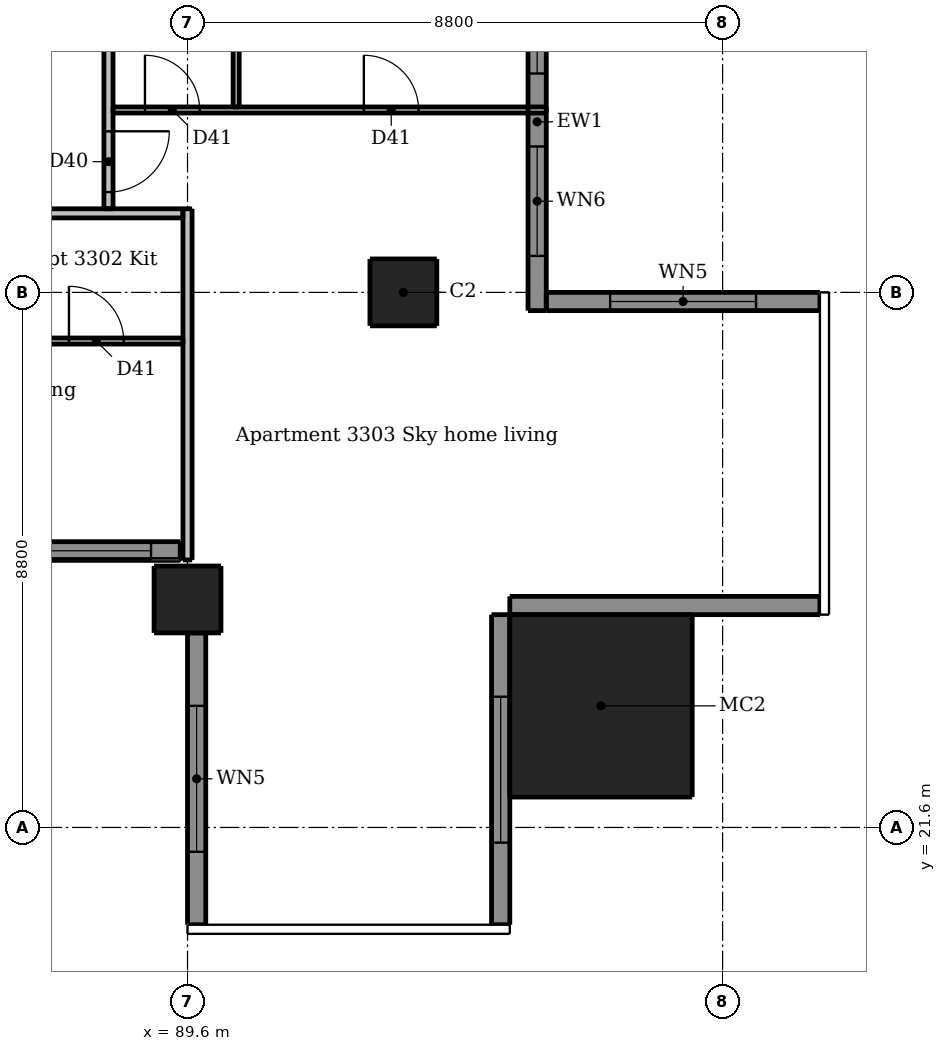
"""IFC4 building model, lengths in metres.
Left out: names, types, materials, properties, quantities, classifications, styles, units other than length and angle.
Written with IfcOpenShell. Run it as: python <this file> out.ifc"""

import sys

from ifc_helpers import new_model, si_unit, direction, frame, frame_2d, origin, origin_2d, place, context, subcontext, project, spatial, rectangle, extrude, element, fill, save


model = new_model("IFC4")
c1 = context("Model", 3, precision=1e-05, world=origin(), true_north=direction((0.0, 1.0)))
c2 = subcontext(c1, "Body", "Model", "MODEL_VIEW")
j1 = project(units=[si_unit("LENGTHUNIT", "METRE"), si_unit("PLANEANGLEUNIT", "RADIAN")], contexts=[c1])
p1 = place(None, origin())
s1 = spatial("IfcSite", under=j1, at=p1, CompositionType="ELEMENT")
p2 = place(p1, origin())
s2 = spatial("IfcBuilding", under=s1, at=p2, CompositionType="ELEMENT")
p3 = place(p2, frame((0.0, 0.0, 121.6)))
s3 = spatial("IfcBuildingStorey", under=s2, at=p3, CompositionType="ELEMENT", Elevation=121.6)
for number, where, z_axis, x_axis in (
    (1, (89.6, 25.35, 0.0), (0.0, 0.0, 1.0), (1.0, 0.0, 0.0)),
    (2, (93.15, 30.4, 0.0), (0.0, 0.0, 1.0), (1.0, 0.0, 0.0)),
):
    element("IfcColumn", number, at=place(p3, frame(where, z_axis=z_axis, x_axis=x_axis)), inside=s3, PredefinedType="COLUMN", context=c2, shape_type="SweptSolid", body=[
        extrude(rectangle(XDim=1.1, YDim=1.1, at=origin_2d()), origin(), (0.0, 0.0, 1.0), 2.95),
    ])
p4 = place(p3, frame((96.4, 23.6, 0.0), z_axis=(0.0, 0.0, 1.0), x_axis=(1.0, 0.0, 0.0)))
e3 = element("IfcColumn", 3, at=p4, inside=s3, PredefinedType="COLUMN", context=c2, shape_type="SweptSolid", body=[
    extrude(rectangle(XDim=3.0, YDim=3.0, at=origin_2d()), origin(), (0.0, 0.0, 1.0), 3.3),
])
p5 = place(p3, frame((89.75, 24.8, 0.0), z_axis=(0.0, 0.0, 1.0), x_axis=(0.0, -1.0, 0.0)))
e4 = element("IfcWall", 4, at=p5, inside=s3, PredefinedType="SOLIDWALL", context=c2, shape_type="SweptSolid", body=[
    extrude(rectangle(XDim=4.8, YDim=0.3, at=frame_2d((2.4, 0.0))), origin(), (0.0, 0.0, 1.0), 2.95),
])
p6 = place(p5, frame((1.2, 0.0, 0.15)))
e5 = element("IfcOpeningElement", 5, at=p6, cuts=e4, PredefinedType="OPENING", context=c2, shape_type="SweptSolid", body=[
    extrude(rectangle(XDim=2.4, YDim=2.1, at=frame_2d((1.2, 1.05))), frame((0.0, 0.16, 0.0), z_axis=(0.0, -1.0, 0.0), x_axis=(1.0, 0.0, 0.0)), (0.0, 0.0, 1.0), 0.32),
])
p7 = place(p3, frame((94.75, 20.0, 0.0), z_axis=(0.0, 0.0, 1.0), x_axis=(0.0, 1.0, 0.0)))
e6 = element("IfcWall", 6, at=p7, inside=s3, PredefinedType="SOLIDWALL", context=c2, shape_type="SweptSolid", body=[
    extrude(rectangle(XDim=5.1, YDim=0.3, at=frame_2d((2.55, 0.0))), origin(), (0.0, 0.0, 1.0), 2.95),
])
p8 = place(p7, frame((1.35, 0.0, 0.15)))
e7 = element("IfcOpeningElement", 7, at=p8, cuts=e6, PredefinedType="OPENING", context=c2, shape_type="SweptSolid", body=[
    extrude(rectangle(XDim=2.4, YDim=2.1, at=frame_2d((1.2, 1.05))), frame((0.0, 0.16, 0.0), z_axis=(0.0, -1.0, 0.0), x_axis=(1.0, 0.0, 0.0)), (0.0, 0.0, 1.0), 0.32),
])
p9 = place(p3, frame((94.9, 25.25, 0.0), z_axis=(0.0, 0.0, 1.0), x_axis=(1.0, 0.0, 0.0)))
e8 = element("IfcWall", 8, at=p9, inside=s3, PredefinedType="SOLIDWALL", context=c2, shape_type="SweptSolid", body=[
    extrude(rectangle(XDim=5.1, YDim=0.3, at=frame_2d((2.55, 0.0))), origin(), (0.0, 0.0, 1.0), 2.95),
])
p10 = place(p3, frame((100.0, 30.25, 0.0), z_axis=(0.0, 0.0, 1.0), x_axis=(-1.0, 0.0, 0.0)))
e9 = element("IfcWall", 9, at=p10, inside=s3, PredefinedType="SOLIDWALL", context=c2, shape_type="SweptSolid", body=[
    extrude(rectangle(XDim=4.5, YDim=0.3, at=frame_2d((2.25, 0.0))), origin(), (0.0, 0.0, 1.0), 2.95),
])
p11 = place(p10, frame((1.05, 0.0, 0.15)))
e10 = element("IfcOpeningElement", 10, at=p11, cuts=e9, PredefinedType="OPENING", context=c2, shape_type="SweptSolid", body=[
    extrude(rectangle(XDim=2.4, YDim=2.1, at=frame_2d((1.2, 1.05))), frame((0.0, 0.16, 0.0), z_axis=(0.0, -1.0, 0.0), x_axis=(1.0, 0.0, 0.0)), (0.0, 0.0, 1.0), 0.32),
])
p12 = place(p3, frame((83.72, 26.15, 0.0), z_axis=(0.0, 0.0, 1.0), x_axis=(1.0, 0.0, 0.0)))
e11 = element("IfcWall", 11, at=p12, inside=s3, PredefinedType="SOLIDWALL", context=c2, shape_type="SweptSolid", body=[
    extrude(rectangle(XDim=5.76, YDim=0.3, at=frame_2d((2.88, 0.0))), origin(), (0.0, 0.0, 1.0), 2.95),
])
p13 = place(p12, frame((0.48, 0.0, 0.15)))
e12 = element("IfcOpeningElement", 12, at=p13, cuts=e11, PredefinedType="OPENING", context=c2, shape_type="SweptSolid", body=[
    extrude(rectangle(XDim=1.8, YDim=2.1, at=frame_2d((0.9, 1.05))), frame((0.0, 0.16, 0.0), z_axis=(0.0, -1.0, 0.0), x_axis=(1.0, 0.0, 0.0)), (0.0, 0.0, 1.0), 0.32),
])
p14 = place(p12, frame((3.48, 0.0, 0.15)))
e13 = element("IfcOpeningElement", 13, at=p14, cuts=e11, PredefinedType="OPENING", context=c2, shape_type="SweptSolid", body=[
    extrude(rectangle(XDim=1.8, YDim=2.1, at=frame_2d((0.9, 1.05))), frame((0.0, 0.16, 0.0), z_axis=(0.0, -1.0, 0.0), x_axis=(1.0, 0.0, 0.0)), (0.0, 0.0, 1.0), 0.32),
])
p15 = place(p3, frame((95.35, 30.1, 0.0), z_axis=(0.0, 0.0, 1.0), x_axis=(0.0, 1.0, 0.0)))
e14 = element("IfcWall", 14, at=p15, inside=s3, PredefinedType="SOLIDWALL", context=c2, shape_type="SweptSolid", body=[
    extrude(rectangle(XDim=6.21, YDim=0.3, at=frame_2d((3.105, 0.0))), origin(), (0.0, 0.0, 1.0), 2.34),
])
p16 = place(p15, frame((0.9, 0.0, 0.15)))
e15 = element("IfcOpeningElement", 15, at=p16, cuts=e14, PredefinedType="OPENING", context=c2, shape_type="SweptSolid", body=[
    extrude(rectangle(XDim=1.8, YDim=2.1, at=frame_2d((0.9, 1.05))), frame((0.0, 0.16, 0.0), z_axis=(0.0, -1.0, 0.0), x_axis=(1.0, 0.0, 0.0)), (0.0, 0.0, 1.0), 0.32),
])
p17 = place(p15, frame((3.9, 0.0, 0.15)))
e16 = element("IfcOpeningElement", 16, at=p17, cuts=e14, PredefinedType="OPENING", context=c2, shape_type="SweptSolid", body=[
    extrude(rectangle(XDim=1.8, YDim=2.1, at=frame_2d((0.9, 1.05))), frame((0.0, 0.16, 0.0), z_axis=(0.0, -1.0, 0.0), x_axis=(1.0, 0.0, 0.0)), (0.0, 0.0, 1.0), 0.32),
])
p18 = place(p3, frame((90.4, 33.45, 0.0), z_axis=(0.0, 0.0, 1.0), x_axis=(0.0, 1.0, 0.0)))
e17 = element("IfcWall", 17, at=p18, inside=s3, PredefinedType="PARTITIONING", context=c2, shape_type="SweptSolid", body=[
    extrude(rectangle(XDim=5.875, YDim=0.1, at=frame_2d((2.938, 0.0))), origin(), (0.0, 0.0, 1.0), 2.95),
])
p19 = place(p18, frame((3.75, 0.0, 0.0)))
e18 = element("IfcOpeningElement", 18, at=p19, cuts=e17, PredefinedType="OPENING", context=c2, shape_type="SweptSolid", body=[
    extrude(rectangle(XDim=0.8, YDim=2.1, at=frame_2d((0.4, 1.05))), frame((0.0, 0.06, 0.0), z_axis=(0.0, -1.0, 0.0), x_axis=(1.0, 0.0, 0.0)), (0.0, 0.0, 1.0), 0.12),
])
p20 = place(p3, frame((88.375, 33.4, 0.0), z_axis=(0.0, 0.0, 1.0), x_axis=(1.0, 0.0, 0.0)))
e19 = element("IfcWall", 19, at=p20, inside=s3, PredefinedType="PARTITIONING", context=c2, shape_type="SweptSolid", body=[
    extrude(rectangle(XDim=7.125, YDim=0.1, at=frame_2d((3.562, 0.0))), origin(), (0.0, 0.0, 1.0), 2.95),
])
p21 = place(p20, frame((0.525, 0.0, 0.0)))
e20 = element("IfcOpeningElement", 20, at=p21, cuts=e19, PredefinedType="OPENING", context=c2, shape_type="SweptSolid", body=[
    extrude(rectangle(XDim=0.9, YDim=2.1, at=frame_2d((0.45, 1.05))), frame((0.0, 0.06, 0.0), z_axis=(0.0, -1.0, 0.0), x_axis=(1.0, 0.0, 0.0)), (0.0, 0.0, 1.0), 0.12),
])
p22 = place(p20, frame((4.125, 0.0, 0.0)))
e21 = element("IfcOpeningElement", 21, at=p22, cuts=e19, PredefinedType="OPENING", context=c2, shape_type="SweptSolid", body=[
    extrude(rectangle(XDim=0.9, YDim=2.1, at=frame_2d((0.45, 1.05))), frame((0.0, 0.06, 0.0), z_axis=(0.0, -1.0, 0.0), x_axis=(1.0, 0.0, 0.0)), (0.0, 0.0, 1.0), 0.12),
])
p23 = place(p3, frame((86.65, 29.6, 0.0), z_axis=(0.0, 0.0, 1.0), x_axis=(1.0, 0.0, 0.0)))
e22 = element("IfcWall", 22, at=p23, inside=s3, PredefinedType="PARTITIONING", context=c2, shape_type="SweptSolid", body=[
    extrude(rectangle(XDim=2.875, YDim=0.1, at=frame_2d((1.438, 0.0))), origin(), (0.0, 0.0, 1.0), 2.95),
])
p24 = place(p23, frame((1.0, 0.0, 0.0)))
e23 = element("IfcOpeningElement", 23, at=p24, cuts=e22, PredefinedType="OPENING", context=c2, shape_type="SweptSolid", body=[
    extrude(rectangle(XDim=0.9, YDim=2.1, at=frame_2d((0.45, 1.05))), frame((0.0, 0.06, 0.0), z_axis=(0.0, -1.0, 0.0), x_axis=(1.0, 0.0, 0.0)), (0.0, 0.0, 1.0), 0.12),
])
p25 = place(p3, frame((88.3, 60.475, 0.0), z_axis=(0.0, 0.0, 1.0), x_axis=(0.0, -1.0, 0.0)))
e24 = element("IfcWall", 24, at=p25, inside=s3, PredefinedType="PARTITIONING", context=c2, shape_type="SweptSolid", body=[
    extrude(rectangle(XDim=28.7, YDim=0.15, at=frame_2d((14.35, 0.0))), origin(), (0.0, 0.0, 1.0), 2.95),
])
p26 = place(p25, frame((27.425, 0.0, 0.0)))
e25 = element("IfcOpeningElement", 25, at=p26, cuts=e24, PredefinedType="OPENING", context=c2, shape_type="SweptSolid", body=[
    extrude(rectangle(XDim=1.0, YDim=2.1, at=frame_2d((0.5, 1.05))), frame((0.0, 0.085, 0.0), z_axis=(0.0, -1.0, 0.0), x_axis=(1.0, 0.0, 0.0)), (0.0, 0.0, 1.0), 0.17),
])
p27 = place(p25, frame((13.075, 0.0, 0.0)))
e26 = element("IfcOpeningElement", 26, at=p27, cuts=e24, PredefinedType="OPENING", context=c2, shape_type="SweptSolid", body=[
    extrude(rectangle(XDim=1.0, YDim=2.1, at=frame_2d((0.5, 1.05))), frame((0.0, 0.085, 0.0), z_axis=(0.0, -1.0, 0.0), x_axis=(1.0, 0.0, 0.0)), (0.0, 0.0, 1.0), 0.17),
])
p28 = place(p25, frame((2.575, 0.0, 0.0)))
e27 = element("IfcOpeningElement", 27, at=p28, cuts=e24, PredefinedType="OPENING", context=c2, shape_type="SweptSolid", body=[
    extrude(rectangle(XDim=1.0, YDim=2.1, at=frame_2d((0.5, 1.05))), frame((0.0, 0.085, 0.0), z_axis=(0.0, -1.0, 0.0), x_axis=(1.0, 0.0, 0.0)), (0.0, 0.0, 1.0), 0.17),
])
p29 = place(p3, frame((89.6, 26.0, 0.0), z_axis=(0.0, 0.0, 1.0), x_axis=(0.0, 1.0, 0.0)))
e28 = element("IfcWall", 28, at=p29, inside=s3, PredefinedType="PARTITIONING", context=c2, shape_type="SweptSolid", body=[
    extrude(rectangle(XDim=5.775, YDim=0.15, at=frame_2d((2.887, 0.0))), origin(), (0.0, 0.0, 1.0), 2.332),
])
p30 = place(p3, frame((89.525, 31.7, 0.0), z_axis=(0.0, 0.0, 1.0), x_axis=(-1.0, 0.0, 0.0)))
e29 = element("IfcWall", 29, at=p30, inside=s3, PredefinedType="PARTITIONING", context=c2, shape_type="SweptSolid", body=[
    extrude(rectangle(XDim=28.75, YDim=0.15, at=frame_2d((14.375, 0.0))), origin(), (0.0, 0.0, 1.0), 2.95),
])
p31 = place(p30, frame((24.625, 0.0, 0.0)))
e30 = element("IfcOpeningElement", 30, at=p31, cuts=e29, PredefinedType="OPENING", context=c2, shape_type="SweptSolid", body=[
    extrude(rectangle(XDim=1.0, YDim=2.1, at=frame_2d((0.5, 1.05))), frame((0.0, 0.085, 0.0), z_axis=(0.0, -1.0, 0.0), x_axis=(1.0, 0.0, 0.0)), (0.0, 0.0, 1.0), 0.17),
])
p32 = place(p30, frame((5.425, 0.0, 0.0)))
e31 = element("IfcOpeningElement", 31, at=p32, cuts=e29, PredefinedType="OPENING", context=c2, shape_type="SweptSolid", body=[
    extrude(rectangle(XDim=1.0, YDim=2.1, at=frame_2d((0.5, 1.05))), frame((0.0, 0.085, 0.0), z_axis=(0.0, -1.0, 0.0), x_axis=(1.0, 0.0, 0.0)), (0.0, 0.0, 1.0), 0.17),
])
p33 = place(p6, origin())
e32 = element("IfcWindow", 32, at=p33, inside=s3, PartitioningType="DOUBLE_PANEL_VERTICAL", PredefinedType="WINDOW", context=c2, shape_type="SweptSolid", body=[
    extrude(rectangle(XDim=2.4, YDim=2.1, at=frame_2d((1.2, 1.05))), frame((0.0, 0.03, 0.0), z_axis=(0.0, -1.0, 0.0), x_axis=(1.0, 0.0, 0.0)), (0.0, 0.0, 1.0), 0.06),
])
fill(e5, e32)
p34 = place(p8, origin())
e33 = element("IfcWindow", 33, at=p34, inside=s3, PartitioningType="DOUBLE_PANEL_VERTICAL", PredefinedType="WINDOW", context=c2, shape_type="SweptSolid", body=[
    extrude(rectangle(XDim=2.4, YDim=2.1, at=frame_2d((1.2, 1.05))), frame((0.0, 0.03, 0.0), z_axis=(0.0, -1.0, 0.0), x_axis=(1.0, 0.0, 0.0)), (0.0, 0.0, 1.0), 0.06),
])
fill(e7, e33)
p35 = place(p11, origin())
e34 = element("IfcWindow", 34, at=p35, inside=s3, PartitioningType="DOUBLE_PANEL_VERTICAL", PredefinedType="WINDOW", context=c2, shape_type="SweptSolid", body=[
    extrude(rectangle(XDim=2.4, YDim=2.1, at=frame_2d((1.2, 1.05))), frame((0.0, 0.03, 0.0), z_axis=(0.0, -1.0, 0.0), x_axis=(1.0, 0.0, 0.0)), (0.0, 0.0, 1.0), 0.06),
])
fill(e10, e34)
p36 = place(p14, origin())
e35 = element("IfcWindow", 35, at=p36, inside=s3, PartitioningType="DOUBLE_PANEL_VERTICAL", PredefinedType="WINDOW", context=c2, shape_type="SweptSolid", body=[
    extrude(rectangle(XDim=1.8, YDim=2.1, at=frame_2d((0.9, 1.05))), frame((0.0, 0.03, 0.0), z_axis=(0.0, -1.0, 0.0), x_axis=(1.0, 0.0, 0.0)), (0.0, 0.0, 1.0), 0.06),
])
fill(e13, e35)
p37 = place(p16, origin())
e36 = element("IfcWindow", 36, at=p37, inside=s3, PartitioningType="DOUBLE_PANEL_VERTICAL", PredefinedType="WINDOW", context=c2, shape_type="SweptSolid", body=[
    extrude(rectangle(XDim=1.8, YDim=2.1, at=frame_2d((0.9, 1.05))), frame((0.0, 0.03, 0.0), z_axis=(0.0, -1.0, 0.0), x_axis=(1.0, 0.0, 0.0)), (0.0, 0.0, 1.0), 0.06),
])
fill(e15, e36)
p38 = place(p17, origin())
e37 = element("IfcWindow", 37, at=p38, inside=s3, PartitioningType="DOUBLE_PANEL_VERTICAL", PredefinedType="WINDOW", context=c2, shape_type="SweptSolid", body=[
    extrude(rectangle(XDim=1.8, YDim=2.1, at=frame_2d((0.9, 1.05))), frame((0.0, 0.03, 0.0), z_axis=(0.0, -1.0, 0.0), x_axis=(1.0, 0.0, 0.0)), (0.0, 0.0, 1.0), 0.06),
])
fill(e16, e37)
p39 = place(p24, origin())
e38 = element("IfcDoor", 38, at=p39, inside=s3, OperationType="SINGLE_SWING_LEFT", PredefinedType="DOOR", context=c2, shape_type="SweptSolid", body=[
    extrude(rectangle(XDim=0.9, YDim=2.1, at=frame_2d((0.45, 1.05))), frame((0.0, 0.025, 0.0), z_axis=(0.0, -1.0, 0.0), x_axis=(1.0, 0.0, 0.0)), (0.0, 0.0, 1.0), 0.05),
])
fill(e23, e38)
p40 = place(p26, origin())
e39 = element("IfcDoor", 39, at=p40, inside=s3, OperationType="SINGLE_SWING_LEFT", PredefinedType="DOOR", context=c2, shape_type="SweptSolid", body=[
    extrude(rectangle(XDim=1.0, YDim=2.1, at=frame_2d((0.5, 1.05))), frame((0.0, 0.025, 0.0), z_axis=(0.0, -1.0, 0.0), x_axis=(1.0, 0.0, 0.0)), (0.0, 0.0, 1.0), 0.05),
])
fill(e25, e39)
p41 = place(p21, origin())
e40 = element("IfcDoor", 40, at=p41, inside=s3, OperationType="SINGLE_SWING_LEFT", PredefinedType="DOOR", context=c2, shape_type="SweptSolid", body=[
    extrude(rectangle(XDim=0.9, YDim=2.1, at=frame_2d((0.45, 1.05))), frame((0.0, 0.025, 0.0), z_axis=(0.0, -1.0, 0.0), x_axis=(1.0, 0.0, 0.0)), (0.0, 0.0, 1.0), 0.05),
])
fill(e20, e40)
p42 = place(p22, origin())
e41 = element("IfcDoor", 41, at=p42, inside=s3, OperationType="SINGLE_SWING_LEFT", PredefinedType="DOOR", context=c2, shape_type="SweptSolid", body=[
    extrude(rectangle(XDim=0.9, YDim=2.1, at=frame_2d((0.45, 1.05))), frame((0.0, 0.025, 0.0), z_axis=(0.0, -1.0, 0.0), x_axis=(1.0, 0.0, 0.0)), (0.0, 0.0, 1.0), 0.05),
])
fill(e21, e41)
save(model, sys.argv[1])
